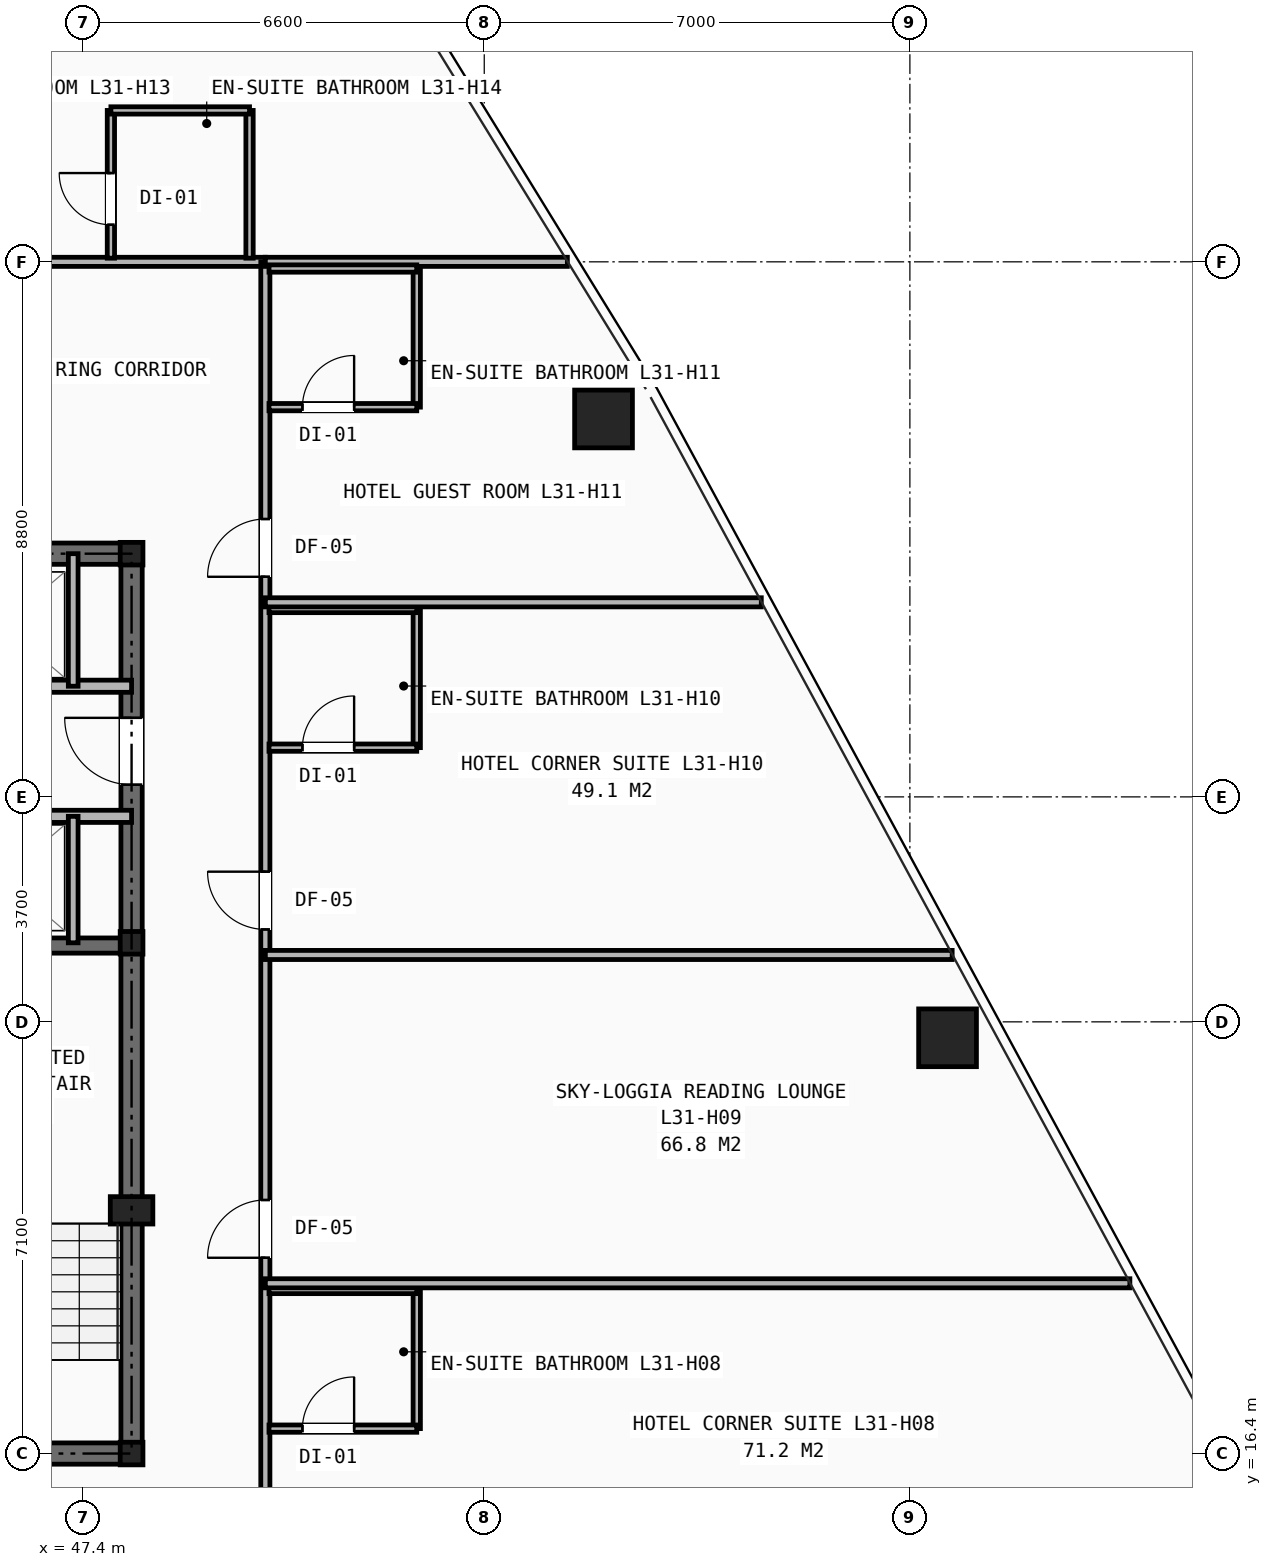
"""IFC4 building model, lengths in metres.
Left out: names, types, materials, properties, quantities, classifications, styles, units other than length and angle.
Written with IfcOpenShell. Run it as: python <this file> out.ifc"""

import sys

from ifc_helpers import new_model, si_unit, direction, frame, frame_2d, origin, origin_2d, place, context, subcontext, project, spatial, rectangle, hollow_rectangle, i_section, extrude, element, fill, save


model = new_model("IFC4")
c1 = context("Model", 3, precision=1e-05, world=origin(), true_north=direction((0.0, 1.0)))
c2 = subcontext(c1, "Body", "Model", "MODEL_VIEW")
j1 = project(units=[si_unit("LENGTHUNIT", "METRE"), si_unit("PLANEANGLEUNIT", "RADIAN")], contexts=[c1])
p1 = place(None, origin())
s1 = spatial("IfcSite", under=j1, at=p1, CompositionType="ELEMENT")
p2 = place(p1, origin())
s2 = spatial("IfcBuilding", under=s1, at=p2, CompositionType="ELEMENT")
p3 = place(p2, frame((0.0, 0.0, 108.6)))
s3 = spatial("IfcBuildingStorey", under=s2, at=p3, CompositionType="ELEMENT", Elevation=108.6)
for number, where, z_axis, x_axis in (
    (1, (48.2, 16.4, 0.0), (0.0, 0.0, 1.0), (1.0, 0.0, 0.0)),
    (2, (48.2, 24.8, 0.0), (0.0, 0.0, 1.0), (1.0, 0.0, 0.0)),
    (3, (48.2, 31.2, 0.0), (0.0, 0.0, 1.0), (1.0, 0.0, 0.0)),
):
    element("IfcColumn", number, at=place(p3, frame(where, z_axis=z_axis, x_axis=x_axis)), inside=s3, PredefinedType="COLUMN", context=c2, shape_type="SweptSolid", body=[
        extrude(i_section(OverallWidth=0.374, OverallDepth=0.372, WebThickness=0.016, FlangeThickness=0.026, at=origin_2d()), origin(), (0.0, 0.0, 1.0), 3.2),
    ])
p4 = place(p3, frame((48.2, 20.4, 0.0), z_axis=(0.0, 0.0, 1.0), x_axis=(1.0, 0.0, 0.0)))
e4 = element("IfcColumn", 4, at=p4, inside=s3, PredefinedType="PILASTER", context=c2, shape_type="SweptSolid", body=[
    extrude(rectangle(XDim=0.7, YDim=0.45, at=origin_2d()), origin(), (0.0, 0.0, 1.0), 3.2),
])
for number, where, z_axis, x_axis in (
    (5, (61.619, 23.238, 0.0), (0.0, 0.0, 1.0), (1.0, 0.0, 0.0)),
    (6, (55.962, 33.416, 0.0), (0.0, 0.0, 1.0), (1.0, 0.0, 0.0)),
):
    element("IfcColumn", number, at=place(p3, frame(where, z_axis=z_axis, x_axis=x_axis)), inside=s3, PredefinedType="COLUMN", context=c2, shape_type="SweptSolid", body=[
        extrude(hollow_rectangle(XDim=0.95, YDim=0.95, WallThickness=0.065, at=origin_2d()), origin(), (0.0, 0.0, 1.0), 3.2),
    ])
p5 = place(p3, frame((31.8, 16.4, 0.0), z_axis=(0.0, 0.0, 1.0), x_axis=(1.0, 0.0, 0.0)))
e7 = element("IfcWall", 7, at=p5, inside=s3, PredefinedType="SHEAR", context=c2, shape_type="SweptSolid", body=[
    extrude(rectangle(XDim=16.4, YDim=0.35, at=frame_2d((8.2, 0.0))), origin(), (0.0, 0.0, 1.0), 2.94),
])
p6 = place(p5, frame((7.75, 0.0, 0.0)))
e8 = element("IfcOpeningElement", 8, at=p6, cuts=e7, PredefinedType="OPENING", context=c2, shape_type="SweptSolid", body=[
    extrude(rectangle(XDim=0.9, YDim=2.1, at=frame_2d((0.45, 1.05))), frame((0.0, 0.185, 0.0), z_axis=(0.0, -1.0, 0.0), x_axis=(1.0, 0.0, 0.0)), (0.0, 0.0, 1.0), 0.37),
])
p7 = place(p5, frame((4.2, 0.0, 0.0)))
e9 = element("IfcOpeningElement", 9, at=p7, cuts=e7, PredefinedType="OPENING", context=c2, shape_type="SweptSolid", body=[
    extrude(rectangle(XDim=0.95, YDim=2.1, at=frame_2d((0.475, 1.05))), frame((0.0, 0.185, 0.0), z_axis=(0.0, -1.0, 0.0), x_axis=(1.0, 0.0, 0.0)), (0.0, 0.0, 1.0), 0.37),
])
p8 = place(p5, frame((10.6, 0.0, 0.0)))
e10 = element("IfcOpeningElement", 10, at=p8, cuts=e7, PredefinedType="OPENING", context=c2, shape_type="SweptSolid", body=[
    extrude(rectangle(XDim=0.95, YDim=2.1, at=frame_2d((0.475, 1.05))), frame((0.0, 0.185, 0.0), z_axis=(0.0, -1.0, 0.0), x_axis=(1.0, 0.0, 0.0)), (0.0, 0.0, 1.0), 0.37),
])
p9 = place(p3, frame((31.8, 31.2, 0.0), z_axis=(0.0, 0.0, 1.0), x_axis=(1.0, 0.0, 0.0)))
e11 = element("IfcWall", 11, at=p9, inside=s3, PredefinedType="SHEAR", context=c2, shape_type="SweptSolid", body=[
    extrude(rectangle(XDim=16.4, YDim=0.35, at=frame_2d((8.2, 0.0))), origin(), (0.0, 0.0, 1.0), 2.94),
])
p10 = place(p3, frame((48.2, 16.4, 0.0), z_axis=(0.0, 0.0, 1.0), x_axis=(0.0, 1.0, 0.0)))
e12 = element("IfcWall", 12, at=p10, inside=s3, PredefinedType="SHEAR", context=c2, shape_type="SweptSolid", body=[
    extrude(rectangle(XDim=14.8, YDim=0.35, at=frame_2d((7.4, 0.0))), origin(), (0.0, 0.0, 1.0), 2.94),
])
p11 = place(p10, frame((11.0, 0.0, 0.0)))
e13 = element("IfcOpeningElement", 13, at=p11, cuts=e12, PredefinedType="OPENING", context=c2, shape_type="SweptSolid", body=[
    extrude(rectangle(XDim=1.1, YDim=2.15, at=frame_2d((0.55, 1.075))), frame((0.0, 0.185, 0.0), z_axis=(0.0, -1.0, 0.0), x_axis=(1.0, 0.0, 0.0)), (0.0, 0.0, 1.0), 0.37),
])
p12 = place(p3, frame((44.955, 24.755, 0.0), z_axis=(0.0, 0.0, 1.0), x_axis=(1.0, 0.0, 0.0)))
e14 = element("IfcWall", 14, at=p12, inside=s3, PredefinedType="SHEAR", context=c2, shape_type="SweptSolid", body=[
    extrude(rectangle(XDim=3.245, YDim=0.25, at=frame_2d((1.623, 0.0))), origin(), (0.0, 0.0, 1.0), 2.94),
])
p13 = place(p3, frame((31.8, 29.02, 0.0), z_axis=(0.0, 0.0, 1.0), x_axis=(1.0, 0.0, 0.0)))
e15 = element("IfcWall", 15, at=p13, inside=s3, PredefinedType="SOLIDWALL", context=c2, shape_type="SweptSolid", body=[
    extrude(rectangle(XDim=16.4, YDim=0.2, at=frame_2d((8.2, 0.0))), origin(), (0.0, 0.0, 1.0), 2.391),
])
p14 = place(p13, frame((0.55, 0.0, 0.0)))
e16 = element("IfcOpeningElement", 16, at=p14, cuts=e15, PredefinedType="OPENING", context=c2, shape_type="SweptSolid", body=[
    extrude(rectangle(XDim=0.85, YDim=2.05, at=frame_2d((0.425, 1.025))), frame((0.0, 0.11, 0.0), z_axis=(0.0, -1.0, 0.0), x_axis=(1.0, 0.0, 0.0)), (0.0, 0.0, 1.0), 0.22),
])
p15 = place(p13, frame((2.55, 0.0, 0.0)))
e17 = element("IfcOpeningElement", 17, at=p15, cuts=e15, PredefinedType="OPENING", context=c2, shape_type="SweptSolid", body=[
    extrude(rectangle(XDim=1.1, YDim=2.15, at=frame_2d((0.55, 1.075))), frame((0.0, 0.11, 0.0), z_axis=(0.0, -1.0, 0.0), x_axis=(1.0, 0.0, 0.0)), (0.0, 0.0, 1.0), 0.22),
])
p16 = place(p13, frame((4.71, 0.0, 0.0)))
e18 = element("IfcOpeningElement", 18, at=p16, cuts=e15, PredefinedType="OPENING", context=c2, shape_type="SweptSolid", body=[
    extrude(rectangle(XDim=1.1, YDim=2.15, at=frame_2d((0.55, 1.075))), frame((0.0, 0.11, 0.0), z_axis=(0.0, -1.0, 0.0), x_axis=(1.0, 0.0, 0.0)), (0.0, 0.0, 1.0), 0.22),
])
p17 = place(p13, frame((6.87, 0.0, 0.0)))
e19 = element("IfcOpeningElement", 19, at=p17, cuts=e15, PredefinedType="OPENING", context=c2, shape_type="SweptSolid", body=[
    extrude(rectangle(XDim=1.1, YDim=2.15, at=frame_2d((0.55, 1.075))), frame((0.0, 0.11, 0.0), z_axis=(0.0, -1.0, 0.0), x_axis=(1.0, 0.0, 0.0)), (0.0, 0.0, 1.0), 0.22),
])
p18 = place(p13, frame((9.03, 0.0, 0.0)))
e20 = element("IfcOpeningElement", 20, at=p18, cuts=e15, PredefinedType="OPENING", context=c2, shape_type="SweptSolid", body=[
    extrude(rectangle(XDim=1.1, YDim=2.15, at=frame_2d((0.55, 1.075))), frame((0.0, 0.11, 0.0), z_axis=(0.0, -1.0, 0.0), x_axis=(1.0, 0.0, 0.0)), (0.0, 0.0, 1.0), 0.22),
])
p19 = place(p3, frame((33.82, 26.88, 0.0), z_axis=(0.0, 0.0, 1.0), x_axis=(1.0, 0.0, 0.0)))
e21 = element("IfcWall", 21, at=p19, inside=s3, PredefinedType="SOLIDWALL", context=c2, shape_type="SweptSolid", body=[
    extrude(rectangle(XDim=14.38, YDim=0.2, at=frame_2d((7.19, 0.0))), origin(), (0.0, 0.0, 1.0), 2.391),
])
p20 = place(p3, frame((47.24, 29.02, 0.0), z_axis=(0.0, 0.0, 1.0), x_axis=(0.0, 1.0, 0.0)))
e22 = element("IfcWall", 22, at=p20, inside=s3, PredefinedType="SOLIDWALL", context=c2, shape_type="SweptSolid", body=[
    extrude(rectangle(XDim=2.18, YDim=0.16, at=frame_2d((1.09, 0.0))), origin(), (0.0, 0.0, 1.0), 2.391),
])
p21 = place(p3, frame((47.24, 24.8, 0.0), z_axis=(0.0, 0.0, 1.0), x_axis=(0.0, 1.0, 0.0)))
e23 = element("IfcWall", 23, at=p21, inside=s3, PredefinedType="SOLIDWALL", context=c2, shape_type="SweptSolid", body=[
    extrude(rectangle(XDim=2.08, YDim=0.16, at=frame_2d((1.04, 0.0))), origin(), (0.0, 0.0, 1.0), 2.94),
])
p22 = place(p3, frame((40.75, 36.0, 0.0), z_axis=(0.0, 0.0, 1.0), x_axis=(1.0, 0.0, 0.0)))
e24 = element("IfcWall", 24, at=p22, inside=s3, PredefinedType="PARTITIONING", context=c2, shape_type="SweptSolid", body=[
    extrude(rectangle(XDim=9.65, YDim=0.15, at=frame_2d((4.825, 0.0))), origin(), (0.0, 0.0, 1.0), 2.473),
])
p23 = place(p22, frame((3.47, 0.0, 0.0)))
e25 = element("IfcOpeningElement", 25, at=p23, cuts=e24, PredefinedType="OPENING", context=c2, shape_type="SweptSolid", body=[
    extrude(rectangle(XDim=0.95, YDim=2.1, at=frame_2d((0.475, 1.05))), frame((0.0, 0.085, 0.0), z_axis=(0.0, -1.0, 0.0), x_axis=(1.0, 0.0, 0.0)), (0.0, 0.0, 1.0), 0.17),
])
p24 = place(p3, frame((50.4, 14.1, 0.0), z_axis=(0.0, 0.0, 1.0), x_axis=(0.0, 1.0, 0.0)))
e26 = element("IfcWall", 26, at=p24, inside=s3, PredefinedType="PARTITIONING", context=c2, shape_type="SweptSolid", body=[
    extrude(rectangle(XDim=21.9, YDim=0.15, at=frame_2d((10.95, 0.0))), origin(), (0.0, 0.0, 1.0), 2.151),
])
p25 = place(p24, frame((0.42, 0.0, 0.0)))
e27 = element("IfcOpeningElement", 27, at=p25, cuts=e26, PredefinedType="OPENING", context=c2, shape_type="SweptSolid", body=[
    extrude(rectangle(XDim=0.95, YDim=2.1, at=frame_2d((0.475, 1.05))), frame((0.0, 0.085, 0.0), z_axis=(0.0, -1.0, 0.0), x_axis=(1.0, 0.0, 0.0)), (0.0, 0.0, 1.0), 0.17),
])
p26 = place(p24, frame((5.52, 0.0, 0.0)))
e28 = element("IfcOpeningElement", 28, at=p26, cuts=e26, PredefinedType="OPENING", context=c2, shape_type="SweptSolid", body=[
    extrude(rectangle(XDim=0.95, YDim=2.1, at=frame_2d((0.475, 1.05))), frame((0.0, 0.085, 0.0), z_axis=(0.0, -1.0, 0.0), x_axis=(1.0, 0.0, 0.0)), (0.0, 0.0, 1.0), 0.17),
])
p27 = place(p24, frame((10.92, 0.0, 0.0)))
e29 = element("IfcOpeningElement", 29, at=p27, cuts=e26, PredefinedType="OPENING", context=c2, shape_type="SweptSolid", body=[
    extrude(rectangle(XDim=0.95, YDim=2.1, at=frame_2d((0.475, 1.05))), frame((0.0, 0.085, 0.0), z_axis=(0.0, -1.0, 0.0), x_axis=(1.0, 0.0, 0.0)), (0.0, 0.0, 1.0), 0.17),
])
p28 = place(p24, frame((16.72, 0.0, 0.0)))
e30 = element("IfcOpeningElement", 30, at=p28, cuts=e26, PredefinedType="OPENING", context=c2, shape_type="SweptSolid", body=[
    extrude(rectangle(XDim=0.95, YDim=2.1, at=frame_2d((0.475, 1.05))), frame((0.0, 0.085, 0.0), z_axis=(0.0, -1.0, 0.0), x_axis=(1.0, 0.0, 0.0)), (0.0, 0.0, 1.0), 0.17),
])
p29 = place(p3, frame((50.4, 36.0, 0.0), z_axis=(0.0, 0.0, 1.0), x_axis=(1.0, 0.0, 0.0)))
e31 = element("IfcWall", 31, at=p29, inside=s3, PredefinedType="PARTITIONING", context=c2, shape_type="SweptSolid", body=[
    extrude(rectangle(XDim=4.967, YDim=0.15, at=frame_2d((2.483, 0.0))), origin(), (0.0, 0.0, 1.0), 2.228),
])
p30 = place(p3, frame((52.89, 16.81, 0.0), z_axis=(0.0, 0.0, 1.0), x_axis=(0.0, 1.0, 0.0)))
e32 = element("IfcWall", 32, at=p30, inside=s3, PredefinedType="PARTITIONING", context=c2, shape_type="SweptSolid", body=[
    extrude(rectangle(XDim=2.28, YDim=0.12, at=frame_2d((1.14, 0.0))), origin(), (0.0, 0.0, 1.0), 2.94),
])
p31 = place(p3, frame((50.46, 16.81, 0.0), z_axis=(0.0, 0.0, 1.0), x_axis=(1.0, 0.0, 0.0)))
e33 = element("IfcWall", 33, at=p31, inside=s3, PredefinedType="PARTITIONING", context=c2, shape_type="SweptSolid", body=[
    extrude(rectangle(XDim=2.43, YDim=0.12, at=frame_2d((1.215, 0.0))), origin(), (0.0, 0.0, 1.0), 2.94),
])
p32 = place(p31, frame((0.55, 0.0, 0.0)))
e34 = element("IfcOpeningElement", 34, at=p32, cuts=e33, PredefinedType="OPENING", context=c2, shape_type="SweptSolid", body=[
    extrude(rectangle(XDim=0.85, YDim=2.05, at=frame_2d((0.425, 1.025))), frame((0.0, 0.07, 0.0), z_axis=(0.0, -1.0, 0.0), x_axis=(1.0, 0.0, 0.0)), (0.0, 0.0, 1.0), 0.14),
])
p33 = place(p3, frame((50.46, 19.09, 0.0), z_axis=(0.0, 0.0, 1.0), x_axis=(1.0, 0.0, 0.0)))
e35 = element("IfcWall", 35, at=p33, inside=s3, PredefinedType="PARTITIONING", context=c2, shape_type="SweptSolid", body=[
    extrude(rectangle(XDim=2.43, YDim=0.12, at=frame_2d((1.215, 0.0))), origin(), (0.0, 0.0, 1.0), 2.94),
])
p34 = place(p3, frame((50.4, 19.2, 0.0), z_axis=(0.0, 0.0, 1.0), x_axis=(1.0, 0.0, 0.0)))
e36 = element("IfcWall", 36, at=p34, inside=s3, PredefinedType="PARTITIONING", context=c2, shape_type="SweptSolid", body=[
    extrude(rectangle(XDim=14.218, YDim=0.15, at=frame_2d((7.109, 0.0))), origin(), (0.0, 0.0, 1.0), 2.228),
])
p35 = place(p3, frame((50.4, 24.6, 0.0), z_axis=(0.0, 0.0, 1.0), x_axis=(1.0, 0.0, 0.0)))
e37 = element("IfcWall", 37, at=p35, inside=s3, PredefinedType="PARTITIONING", context=c2, shape_type="SweptSolid", body=[
    extrude(rectangle(XDim=11.295, YDim=0.15, at=frame_2d((5.648, 0.0))), origin(), (0.0, 0.0, 1.0), 2.228),
])
p36 = place(p3, frame((52.89, 28.01, 0.0), z_axis=(0.0, 0.0, 1.0), x_axis=(0.0, 1.0, 0.0)))
e38 = element("IfcWall", 38, at=p36, inside=s3, PredefinedType="PARTITIONING", context=c2, shape_type="SweptSolid", body=[
    extrude(rectangle(XDim=2.28, YDim=0.12, at=frame_2d((1.14, 0.0))), origin(), (0.0, 0.0, 1.0), 2.94),
])
p37 = place(p3, frame((50.46, 28.01, 0.0), z_axis=(0.0, 0.0, 1.0), x_axis=(1.0, 0.0, 0.0)))
e39 = element("IfcWall", 39, at=p37, inside=s3, PredefinedType="PARTITIONING", context=c2, shape_type="SweptSolid", body=[
    extrude(rectangle(XDim=2.43, YDim=0.12, at=frame_2d((1.215, 0.0))), origin(), (0.0, 0.0, 1.0), 2.94),
])
p38 = place(p37, frame((0.55, 0.0, 0.0)))
e40 = element("IfcOpeningElement", 40, at=p38, cuts=e39, PredefinedType="OPENING", context=c2, shape_type="SweptSolid", body=[
    extrude(rectangle(XDim=0.85, YDim=2.05, at=frame_2d((0.425, 1.025))), frame((0.0, 0.07, 0.0), z_axis=(0.0, -1.0, 0.0), x_axis=(1.0, 0.0, 0.0)), (0.0, 0.0, 1.0), 0.14),
])
p39 = place(p3, frame((50.46, 30.29, 0.0), z_axis=(0.0, 0.0, 1.0), x_axis=(1.0, 0.0, 0.0)))
e41 = element("IfcWall", 41, at=p39, inside=s3, PredefinedType="PARTITIONING", context=c2, shape_type="SweptSolid", body=[
    extrude(rectangle(XDim=2.43, YDim=0.12, at=frame_2d((1.215, 0.0))), origin(), (0.0, 0.0, 1.0), 2.94),
])
p40 = place(p3, frame((50.4, 30.4, 0.0), z_axis=(0.0, 0.0, 1.0), x_axis=(1.0, 0.0, 0.0)))
e42 = element("IfcWall", 42, at=p40, inside=s3, PredefinedType="PARTITIONING", context=c2, shape_type="SweptSolid", body=[
    extrude(rectangle(XDim=8.156, YDim=0.15, at=frame_2d((4.078, 0.0))), origin(), (0.0, 0.0, 1.0), 2.228),
])
p41 = place(p3, frame((52.89, 33.61, 0.0), z_axis=(0.0, 0.0, 1.0), x_axis=(0.0, 1.0, 0.0)))
e43 = element("IfcWall", 43, at=p41, inside=s3, PredefinedType="PARTITIONING", context=c2, shape_type="SweptSolid", body=[
    extrude(rectangle(XDim=2.28, YDim=0.12, at=frame_2d((1.14, 0.0))), origin(), (0.0, 0.0, 1.0), 2.94),
])
p42 = place(p3, frame((50.46, 33.61, 0.0), z_axis=(0.0, 0.0, 1.0), x_axis=(1.0, 0.0, 0.0)))
e44 = element("IfcWall", 44, at=p42, inside=s3, PredefinedType="PARTITIONING", context=c2, shape_type="SweptSolid", body=[
    extrude(rectangle(XDim=2.43, YDim=0.12, at=frame_2d((1.215, 0.0))), origin(), (0.0, 0.0, 1.0), 2.473),
])
p43 = place(p42, frame((0.55, 0.0, 0.0)))
e45 = element("IfcOpeningElement", 45, at=p43, cuts=e44, PredefinedType="OPENING", context=c2, shape_type="SweptSolid", body=[
    extrude(rectangle(XDim=0.85, YDim=2.05, at=frame_2d((0.425, 1.025))), frame((0.0, 0.07, 0.0), z_axis=(0.0, -1.0, 0.0), x_axis=(1.0, 0.0, 0.0)), (0.0, 0.0, 1.0), 0.14),
])
p44 = place(p3, frame((50.46, 35.89, 0.0), z_axis=(0.0, 0.0, 1.0), x_axis=(1.0, 0.0, 0.0)))
e46 = element("IfcWall", 46, at=p44, inside=s3, PredefinedType="PARTITIONING", context=c2, shape_type="SweptSolid", body=[
    extrude(rectangle(XDim=2.43, YDim=0.12, at=frame_2d((1.215, 0.0))), origin(), (0.0, 0.0, 1.0), 2.94),
])
p45 = place(p3, frame((47.86, 36.06, 0.0), z_axis=(0.0, 0.0, 1.0), x_axis=(0.0, 1.0, 0.0)))
e47 = element("IfcWall", 47, at=p45, inside=s3, PredefinedType="PARTITIONING", context=c2, shape_type="SweptSolid", body=[
    extrude(rectangle(XDim=2.43, YDim=0.12, at=frame_2d((1.215, 0.0))), origin(), (0.0, 0.0, 1.0), 2.473),
])
p46 = place(p45, frame((0.55, 0.0, 0.0)))
e48 = element("IfcOpeningElement", 48, at=p46, cuts=e47, PredefinedType="OPENING", context=c2, shape_type="SweptSolid", body=[
    extrude(rectangle(XDim=0.85, YDim=2.05, at=frame_2d((0.425, 1.025))), frame((0.0, 0.07, 0.0), z_axis=(0.0, -1.0, 0.0), x_axis=(1.0, 0.0, 0.0)), (0.0, 0.0, 1.0), 0.14),
])
p47 = place(p3, frame((50.14, 36.06, 0.0), z_axis=(0.0, 0.0, 1.0), x_axis=(0.0, 1.0, 0.0)))
e49 = element("IfcWall", 49, at=p47, inside=s3, PredefinedType="PARTITIONING", context=c2, shape_type="SweptSolid", body=[
    extrude(rectangle(XDim=2.43, YDim=0.12, at=frame_2d((1.215, 0.0))), origin(), (0.0, 0.0, 1.0), 2.94),
])
p48 = place(p3, frame((47.86, 38.49, 0.0), z_axis=(0.0, 0.0, 1.0), x_axis=(1.0, 0.0, 0.0)))
e50 = element("IfcWall", 50, at=p48, inside=s3, PredefinedType="PARTITIONING", context=c2, shape_type="SweptSolid", body=[
    extrude(rectangle(XDim=2.28, YDim=0.12, at=frame_2d((1.14, 0.0))), origin(), (0.0, 0.0, 1.0), 2.473),
])
p49 = place(p11, origin())
e51 = element("IfcDoor", 51, at=p49, inside=s3, OperationType="SINGLE_SWING_RIGHT", PredefinedType="DOOR", context=c2, shape_type="SweptSolid", body=[
    extrude(rectangle(XDim=1.1, YDim=2.15, at=frame_2d((0.55, 1.075))), frame((0.0, 0.025, 0.0), z_axis=(0.0, -1.0, 0.0), x_axis=(1.0, 0.0, 0.0)), (0.0, 0.0, 1.0), 0.05),
])
fill(e13, e51)
p50 = place(p32, origin())
e52 = element("IfcDoor", 52, at=p50, inside=s3, OperationType="SINGLE_SWING_RIGHT", PredefinedType="DOOR", context=c2, shape_type="SweptSolid", body=[
    extrude(rectangle(XDim=0.85, YDim=2.05, at=frame_2d((0.425, 1.025))), frame((0.0, 0.025, 0.0), z_axis=(0.0, -1.0, 0.0), x_axis=(1.0, 0.0, 0.0)), (0.0, 0.0, 1.0), 0.05),
])
fill(e34, e52)
p51 = place(p26, origin())
e53 = element("IfcDoor", 53, at=p51, inside=s3, OperationType="SINGLE_SWING_LEFT", PredefinedType="DOOR", context=c2, shape_type="SweptSolid", body=[
    extrude(rectangle(XDim=0.95, YDim=2.1, at=frame_2d((0.475, 1.05))), frame((0.0, 0.025, 0.0), z_axis=(0.0, -1.0, 0.0), x_axis=(1.0, 0.0, 0.0)), (0.0, 0.0, 1.0), 0.05),
])
fill(e28, e53)
p52 = place(p27, origin())
e54 = element("IfcDoor", 54, at=p52, inside=s3, OperationType="SINGLE_SWING_RIGHT", PredefinedType="DOOR", context=c2, shape_type="SweptSolid", body=[
    extrude(rectangle(XDim=0.95, YDim=2.1, at=frame_2d((0.475, 1.05))), frame((0.0, 0.025, 0.0), z_axis=(0.0, -1.0, 0.0), x_axis=(1.0, 0.0, 0.0)), (0.0, 0.0, 1.0), 0.05),
])
fill(e29, e54)
p53 = place(p38, origin())
e55 = element("IfcDoor", 55, at=p53, inside=s3, OperationType="SINGLE_SWING_RIGHT", PredefinedType="DOOR", context=c2, shape_type="SweptSolid", body=[
    extrude(rectangle(XDim=0.85, YDim=2.05, at=frame_2d((0.425, 1.025))), frame((0.0, 0.025, 0.0), z_axis=(0.0, -1.0, 0.0), x_axis=(1.0, 0.0, 0.0)), (0.0, 0.0, 1.0), 0.05),
])
fill(e40, e55)
p54 = place(p28, origin())
e56 = element("IfcDoor", 56, at=p54, inside=s3, OperationType="SINGLE_SWING_LEFT", PredefinedType="DOOR", context=c2, shape_type="SweptSolid", body=[
    extrude(rectangle(XDim=0.95, YDim=2.1, at=frame_2d((0.475, 1.05))), frame((0.0, 0.025, 0.0), z_axis=(0.0, -1.0, 0.0), x_axis=(1.0, 0.0, 0.0)), (0.0, 0.0, 1.0), 0.05),
])
fill(e30, e56)
p55 = place(p43, origin())
e57 = element("IfcDoor", 57, at=p55, inside=s3, OperationType="SINGLE_SWING_RIGHT", PredefinedType="DOOR", context=c2, shape_type="SweptSolid", body=[
    extrude(rectangle(XDim=0.85, YDim=2.05, at=frame_2d((0.425, 1.025))), frame((0.0, 0.025, 0.0), z_axis=(0.0, -1.0, 0.0), x_axis=(1.0, 0.0, 0.0)), (0.0, 0.0, 1.0), 0.05),
])
fill(e45, e57)
p56 = place(p46, origin())
e58 = element("IfcDoor", 58, at=p56, inside=s3, OperationType="SINGLE_SWING_RIGHT", PredefinedType="DOOR", context=c2, shape_type="SweptSolid", body=[
    extrude(rectangle(XDim=0.85, YDim=2.05, at=frame_2d((0.425, 1.025))), frame((0.0, 0.025, 0.0), z_axis=(0.0, -1.0, 0.0), x_axis=(1.0, 0.0, 0.0)), (0.0, 0.0, 1.0), 0.05),
])
fill(e48, e58)
save(model, sys.argv[1])
